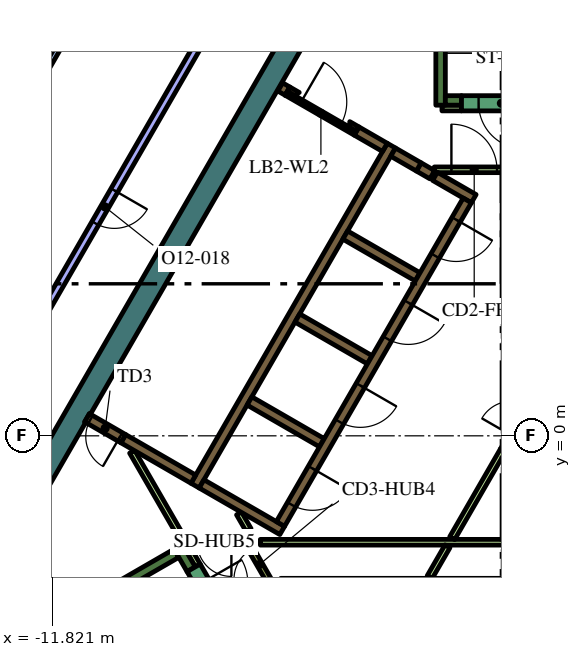
"""IFC4 building model, lengths in metres.
Left out: names, types, materials, properties, quantities, classifications, styles, units other than length and angle.
Written with IfcOpenShell. Run it as: python <this file> out.ifc"""

import sys

from ifc_helpers import new_model, si_unit, direction, frame, frame_2d, origin, place, context, subcontext, project, spatial, polyline, rectangle, outline, extrude, element, fill, save


model = new_model("IFC4")
c1 = context("Model", 3, precision=1e-05, world=origin(), true_north=direction((0.0, 1.0)))
c2 = subcontext(c1, "Body", "Model", "MODEL_VIEW")
j1 = project(units=[si_unit("LENGTHUNIT", "METRE"), si_unit("PLANEANGLEUNIT", "RADIAN")], contexts=[c1])
p1 = place(None, origin())
s1 = spatial("IfcSite", under=j1, at=p1, CompositionType="ELEMENT")
p2 = place(p1, origin())
s2 = spatial("IfcBuilding", under=s1, at=p2, CompositionType="ELEMENT")
p3 = place(p2, frame((0.0, 0.0, 288.0)))
s3 = spatial("IfcBuildingStorey", under=s2, at=p3, CompositionType="ELEMENT", Elevation=288.0)
p4 = place(p3, origin())
e1 = element("IfcWall", 1, at=p4, inside=s3, PredefinedType="SOLIDWALL", context=c2, shape_type="SweptSolid", body=[
    extrude(outline(polyline([(-15.502, -6.35), (-4.912, 11.992), (-4.393, 11.692), (-10.815, 0.569), (-10.84, 0.583), (-10.84, 0.583), (-10.84, 0.583), (-10.965, 0.367), (-10.965, 0.367), (-10.965, 0.367), (-10.94, 0.352), (-11.033, 0.191), (-14.809, -6.35), (-15.156, -6.95), (-15.502, -6.35)])), origin(), (0.0, 0.0, 1.0), 4.2),
])
p5 = place(p3, frame((-1.6, 8.7, 0.0), z_axis=(0.0, 0.0, 1.0), x_axis=(0.0, 1.0, 0.0)))
e2 = element("IfcWall", 2, at=p5, inside=s3, PredefinedType="SOLIDWALL", context=c2, shape_type="SweptSolid", body=[
    extrude(rectangle(XDim=7.05, YDim=0.25, at=frame_2d((3.525, 0.0))), origin(), (0.0, 0.0, 1.0), 4.2),
])
p6 = place(p3, frame((-1.475, 8.825, 0.0), z_axis=(0.0, 0.0, 1.0), x_axis=(1.0, 0.0, 0.0)))
e3 = element("IfcWall", 3, at=p6, inside=s3, PredefinedType="SOLIDWALL", context=c2, shape_type="SweptSolid", body=[
    extrude(rectangle(XDim=0.425, YDim=0.25, at=frame_2d((0.212, 0.0))), origin(), (0.0, 0.0, 1.0), 4.2),
])
p7 = place(p3, frame((-14.44, -6.49, 0.0), z_axis=(0.0, 0.0, 1.0), x_axis=(0.866022966069, 0.500004222222, 0.0)))
e4 = element("IfcWall", 4, at=p7, inside=s3, PredefinedType="SOLIDWALL", context=c2, shape_type="SweptSolid", body=[
    extrude(rectangle(XDim=6.8, YDim=0.25, at=frame_2d((3.4, 0.0))), origin(), (0.0, 0.0, 1.0), 4.2),
])
p8 = place(p3, frame((-8.163, -3.511, 0.0), z_axis=(0.0, 0.0, 1.0), x_axis=(-0.499994068514, 0.866028828302, 0.0)))
e5 = element("IfcWall", 5, at=p8, inside=s3, PredefinedType="SOLIDWALL", context=c2, shape_type="SweptSolid", body=[
    extrude(rectangle(XDim=0.674, YDim=0.25, at=frame_2d((0.337, 0.0))), origin(), (0.0, 0.0, 1.0), 4.2),
])
p9 = place(p3, frame((-8.06, -1.311, 0.0), z_axis=(0.0, 0.0, 1.0), x_axis=(0.50000273126, 0.866023826885, 0.0)))
e6 = element("IfcWall", 6, at=p9, inside=s3, PredefinedType="SOLIDWALL", context=c2, shape_type="SweptSolid", body=[
    extrude(rectangle(XDim=10.33, YDim=0.25, at=frame_2d((5.165, 0.0))), origin(), (0.0, 0.0, 1.0), 4.2),
])
p10 = place(p3, frame((-1.819, 6.87, 0.0), z_axis=(0.0, 0.0, 1.0), x_axis=(-0.866294599386, 0.499533449405, 0.0)))
e7 = element("IfcWall", 7, at=p10, inside=s3, PredefinedType="SOLIDWALL", context=c2, shape_type="SweptSolid", body=[
    extrude(rectangle(XDim=0.41, YDim=0.25, at=frame_2d((0.205, 0.0))), origin(), (0.0, 0.0, 1.0), 4.2),
])
p11 = place(p3, frame((-2.849, 7.465, 0.0), z_axis=(0.0, 0.0, 1.0), x_axis=(0.865955664968, -0.500120771724, 0.0)))
e8 = element("IfcWall", 8, at=p11, inside=s3, PredefinedType="SOLIDWALL", context=c2, shape_type="SweptSolid", body=[
    extrude(rectangle(XDim=0.778, YDim=0.25, at=frame_2d((0.389, 0.0))), origin(), (0.0, 0.0, 1.0), 4.2),
])
p12 = place(p3, frame((-0.728, 6.24, 0.0), z_axis=(0.0, 0.0, 1.0), x_axis=(-0.866002680491, 0.500039355833, 0.0)))
e9 = element("IfcWall", 9, at=p12, inside=s3, PredefinedType="SOLIDWALL", context=c2, shape_type="SweptSolid", body=[
    extrude(rectangle(XDim=1.178, YDim=0.25, at=frame_2d((0.589, 0.0))), origin(), (0.0, 0.0, 1.0), 4.2),
])
for number, where, z_axis, x_axis in (
    (10, (-2.204, 4.182, 0.0), (0.0, 0.0, 1.0), (-0.866, 0.5, 0.0)),
    (11, (-5.369, 3.1, 0.0), (0.0, 0.0, 1.0), (0.866, -0.5, 0.0)),
    (12, (-4.724, -0.182, 0.0), (0.0, 0.0, 1.0), (-0.866, 0.5, 0.0)),
):
    element("IfcWall", number, at=place(p3, frame(where, z_axis=z_axis, x_axis=x_axis)), inside=s3, PredefinedType="SOLIDWALL", context=c2, shape_type="SweptSolid", body=[
        extrude(rectangle(XDim=2.2, YDim=0.25, at=frame_2d((1.1, 0.0))), origin(), (0.0, 0.0, 1.0), 4.2),
    ])
p13 = place(p3, frame((-7.889, -1.265, 0.0), z_axis=(0.0, 0.0, 1.0), x_axis=(0.866057815567, -0.499943856944, 0.0)))
e13 = element("IfcWall", 13, at=p13, inside=s3, PredefinedType="SOLIDWALL", context=c2, shape_type="SweptSolid", body=[
    extrude(rectangle(XDim=2.45, YDim=0.25, at=frame_2d((1.225, 0.0))), origin(), (0.0, 0.0, 1.0), 4.2),
])
p14 = place(p3, frame((-9.95, -0.075, 0.0), z_axis=(0.0, 0.0, 1.0), x_axis=(0.865962177421, -0.500109495288, 0.0)))
e14 = element("IfcWall", 14, at=p14, inside=s3, PredefinedType="SOLIDWALL", context=c2, shape_type="SweptSolid", body=[
    extrude(rectangle(XDim=2.129, YDim=0.25, at=frame_2d((1.065, 0.0))), origin(), (0.0, 0.0, 1.0), 4.2),
])
p15 = place(p3, frame((-5.629, 9.07, 0.0), z_axis=(0.0, 0.0, 1.0), x_axis=(-0.866185586049, 0.49972245349, 0.0)))
e15 = element("IfcWall", 15, at=p15, inside=s3, PredefinedType="SOLIDWALL", context=c2, shape_type="SweptSolid", body=[
    extrude(rectangle(XDim=0.22, YDim=0.25, at=frame_2d((0.11, 0.0))), origin(), (0.0, 0.0, 1.0), 4.2),
])
p16 = place(p3, frame((-3.809, 8.019, 0.0), z_axis=(0.0, 0.0, 1.0), x_axis=(0.866010229787, -0.500026281214, 0.0)))
e16 = element("IfcWall", 16, at=p16, inside=s3, PredefinedType="SOLIDWALL", context=c2, shape_type="SweptSolid", body=[
    extrude(rectangle(XDim=0.858, YDim=0.25, at=frame_2d((0.429, 0.0))), origin(), (0.0, 0.0, 1.0), 4.2),
])
e17 = element("IfcWall", 17, at=p4, inside=s3, PredefinedType="SOLIDWALL", context=c2, shape_type="SweptSolid", body=[
    extrude(outline(polyline([(-3.748, 8.128), (-3.813, 8.015), (-4.027, 8.139), (-4.017, 8.156), (-4.008, 8.173), (-4.0, 8.192), (-3.995, 8.21), (-3.991, 8.23), (-3.99, 8.25), (-3.99, 8.268), (-3.748, 8.128)])), origin(), (0.0, 0.0, 1.0), 4.2),
])
e18 = element("IfcWall", 18, at=p4, inside=s3, PredefinedType="SOLIDWALL", context=c2, shape_type="SweptSolid", body=[
    extrude(outline(polyline([(-5.689, 8.96), (-5.69, 8.961), (-5.565, 9.177), (-5.319, 9.035), (-5.335, 9.026), (-5.351, 9.015), (-5.366, 9.002), (-5.379, 8.988), (-5.392, 8.972), (-5.402, 8.956), (-5.412, 8.939), (-5.629, 9.064), (-5.629, 9.064), (-5.689, 8.96)])), origin(), (0.0, 0.0, 1.0), 4.2),
])
p17 = place(p3, frame((-9.718, -0.417, 0.0), z_axis=(0.0, 0.0, 1.0), x_axis=(0.499966538646, -0.866044721844, 0.0)))
e19 = element("IfcWall", 19, at=p17, inside=s3, PredefinedType="PARTITIONING", context=c2, shape_type="SweptSolid", body=[
    extrude(rectangle(XDim=2.511, YDim=0.15, at=frame_2d((1.255, 0.0))), origin(), (0.0, 0.0, 1.0), 3.55),
])
p18 = place(p3, frame((1.438, -2.8, 0.0), z_axis=(0.0, 0.0, 1.0), x_axis=(-1.0, 0.0, 0.0)))
e20 = element("IfcWall", 20, at=p18, inside=s3, PredefinedType="PARTITIONING", context=c2, shape_type="SweptSolid", body=[
    extrude(rectangle(XDim=7.781, YDim=0.15, at=frame_2d((3.891, 0.0))), origin(), (0.0, 0.0, 1.0), 3.55),
])
p19 = place(p3, frame((-1.418, -2.907, 0.0), z_axis=(0.0, 0.0, 1.0), x_axis=(-0.499978056798, -0.866038072327, 0.0)))
e21 = element("IfcWall", 21, at=p19, inside=s3, PredefinedType="PARTITIONING", context=c2, shape_type="SweptSolid", body=[
    extrude(rectangle(XDim=0.937, YDim=0.15, at=frame_2d((0.469, 0.0))), origin(), (0.0, 0.0, 1.0), 3.55),
])
p20 = place(p3, frame((-1.295, -2.693, 0.0), z_axis=(0.0, 0.0, 1.0), x_axis=(0.500030943131, 0.866007538022, 0.0)))
e22 = element("IfcWall", 22, at=p20, inside=s3, PredefinedType="PARTITIONING", context=c2, shape_type="SweptSolid", body=[
    extrude(rectangle(XDim=2.672, YDim=0.15, at=frame_2d((1.336, 0.0))), origin(), (0.0, 0.0, 1.0), 3.55),
])
p21 = place(p3, frame((-6.653, -2.477, 0.0), z_axis=(0.0, 0.0, 1.0), x_axis=(-0.500002592159, 0.866023907196, 0.0)))
e23 = element("IfcWall", 23, at=p21, inside=s3, PredefinedType="PARTITIONING", context=c2, shape_type="SweptSolid", body=[
    extrude(rectangle(XDim=0.503, YDim=0.15, at=frame_2d((0.251, 0.0))), origin(), (0.0, 0.0, 1.0), 3.55),
])
p22 = place(p3, frame((-7.99, -3.412, 0.0), z_axis=(0.0, 0.0, 1.0), x_axis=(-0.499858525911, 0.866107068482, 0.0)))
e24 = element("IfcWall", 24, at=p22, inside=s3, PredefinedType="PARTITIONING", context=c2, shape_type="SweptSolid", body=[
    extrude(rectangle(XDim=0.466, YDim=0.15, at=frame_2d((0.233, 0.0))), origin(), (0.0, 0.0, 1.0), 3.55),
])
p23 = place(p3, frame((-1.564, 8.625, 0.0), z_axis=(0.0, 0.0, 1.0), x_axis=(1.0, 0.0, 0.0)))
e25 = element("IfcWall", 25, at=p23, inside=s3, PredefinedType="PARTITIONING", context=c2, shape_type="SweptSolid", body=[
    extrude(rectangle(XDim=0.514, YDim=0.15, at=frame_2d((0.257, 0.0))), origin(), (0.0, 0.0, 1.0), 3.55),
])
p24 = place(p3, frame((-0.898, 6.194, 0.0), z_axis=(0.0, 0.0, 1.0), x_axis=(-0.499996202215, -0.866027596426, 0.0)))
e26 = element("IfcWall", 26, at=p24, inside=s3, PredefinedType="SOLIDWALL", context=c2, shape_type="SweptSolid", body=[
    extrude(rectangle(XDim=9.83, YDim=0.25, at=frame_2d((4.915, 0.0))), origin(), (0.0, 0.0, 1.0), 4.2),
])
p25 = place(p24, frame((0.585, 0.0, 0.0)))
e27 = element("IfcOpeningElement", 27, at=p25, cuts=e26, PredefinedType="OPENING", context=c2, shape_type="SweptSolid", body=[
    extrude(rectangle(XDim=1.1, YDim=2.1, at=frame_2d((0.55, 1.05))), frame((0.0, 0.135, 0.0), z_axis=(0.0, -1.0, 0.0), x_axis=(1.0, 0.0, 0.0)), (0.0, 0.0, 1.0), 0.27),
])
p26 = place(p24, frame((3.105, 0.0, 0.0)))
e28 = element("IfcOpeningElement", 28, at=p26, cuts=e26, PredefinedType="OPENING", context=c2, shape_type="SweptSolid", body=[
    extrude(rectangle(XDim=1.1, YDim=2.1, at=frame_2d((0.55, 1.05))), frame((0.0, 0.135, 0.0), z_axis=(0.0, -1.0, 0.0), x_axis=(1.0, 0.0, 0.0)), (0.0, 0.0, 1.0), 0.27),
])
p27 = place(p24, frame((5.625, 0.0, 0.0)))
e29 = element("IfcOpeningElement", 29, at=p27, cuts=e26, PredefinedType="OPENING", context=c2, shape_type="SweptSolid", body=[
    extrude(rectangle(XDim=1.1, YDim=2.1, at=frame_2d((0.55, 1.05))), frame((0.0, 0.135, 0.0), z_axis=(0.0, -1.0, 0.0), x_axis=(1.0, 0.0, 0.0)), (0.0, 0.0, 1.0), 0.27),
])
p28 = place(p24, frame((8.145, 0.0, 0.0)))
e30 = element("IfcOpeningElement", 30, at=p28, cuts=e26, PredefinedType="OPENING", context=c2, shape_type="SweptSolid", body=[
    extrude(rectangle(XDim=1.1, YDim=2.1, at=frame_2d((0.55, 1.05))), frame((0.0, 0.135, 0.0), z_axis=(0.0, -1.0, 0.0), x_axis=(1.0, 0.0, 0.0)), (0.0, 0.0, 1.0), 0.27),
])
p29 = place(p3, frame((1.05, 8.75, 0.0), z_axis=(0.0, 0.0, 1.0), x_axis=(-1.0, 0.0, 0.0)))
e31 = element("IfcWall", 31, at=p29, inside=s3, PredefinedType="SOLIDWALL", context=c2, shape_type="SweptSolid", body=[
    extrude(rectangle(XDim=2.1, YDim=0.4, at=frame_2d((1.05, 0.0))), origin(), (0.0, 0.0, 1.0), 4.2),
])
p30 = place(p29, frame((0.45, 0.0, 0.0)))
e32 = element("IfcOpeningElement", 32, at=p30, cuts=e31, PredefinedType="OPENING", context=c2, shape_type="SweptSolid", body=[
    extrude(rectangle(XDim=1.2, YDim=2.1, at=frame_2d((0.6, 1.05))), frame((0.0, 0.21, 0.0), z_axis=(0.0, -1.0, 0.0), x_axis=(1.0, 0.0, 0.0)), (0.0, 0.0, 1.0), 0.42),
])
p31 = place(p3, frame((-8.098, -3.474, 0.0), z_axis=(0.0, 0.0, 1.0), x_axis=(0.49994051562, -0.866059744384, 0.0)))
e33 = element("IfcWall", 33, at=p31, inside=s3, PredefinedType="SOLIDWALL", context=c2, shape_type="SweptSolid", body=[
    extrude(rectangle(XDim=2.1, YDim=0.4, at=frame_2d((1.05, 0.0))), origin(), (0.0, 0.0, 1.0), 4.2),
])
p32 = place(p31, frame((0.45, 0.0, 0.0)))
e34 = element("IfcOpeningElement", 34, at=p32, cuts=e33, PredefinedType="OPENING", context=c2, shape_type="SweptSolid", body=[
    extrude(rectangle(XDim=1.2, YDim=2.1, at=frame_2d((0.6, 1.05))), frame((0.0, 0.21, 0.0), z_axis=(0.0, -1.0, 0.0), x_axis=(1.0, 0.0, 0.0)), (0.0, 0.0, 1.0), 0.42),
])
p33 = place(p3, frame((-1.765, 7.0, 0.0), z_axis=(0.0, 0.0, 1.0), x_axis=(1.0, 0.0, 0.0)))
e35 = element("IfcWall", 35, at=p33, inside=s3, PredefinedType="PARTITIONING", context=c2, shape_type="SweptSolid", body=[
    extrude(rectangle(XDim=2.1, YDim=0.15, at=frame_2d((1.05, 0.0))), origin(), (0.0, 0.0, 1.0), 3.55),
])
p34 = place(p33, frame((0.45, 0.0, 0.0)))
e36 = element("IfcOpeningElement", 36, at=p34, cuts=e35, PredefinedType="OPENING", context=c2, shape_type="SweptSolid", body=[
    extrude(rectangle(XDim=1.2, YDim=2.1, at=frame_2d((0.6, 1.05))), frame((0.0, 0.085, 0.0), z_axis=(0.0, -1.0, 0.0), x_axis=(1.0, 0.0, 0.0)), (0.0, 0.0, 1.0), 0.17),
])
p35 = place(p3, frame((-5.861, -4.248, 0.0), z_axis=(0.0, 0.0, 1.0), x_axis=(-0.500043646338, 0.866000203093, 0.0)))
e37 = element("IfcWall", 37, at=p35, inside=s3, PredefinedType="PARTITIONING", context=c2, shape_type="SweptSolid", body=[
    extrude(rectangle(XDim=1.93, YDim=0.15, at=frame_2d((0.965, 0.0))), origin(), (0.0, 0.0, 1.0), 4.2),
])
p36 = place(p35, frame((0.55, 0.0, 0.0)))
e38 = element("IfcOpeningElement", 38, at=p36, cuts=e37, PredefinedType="OPENING", context=c2, shape_type="SweptSolid", body=[
    extrude(rectangle(XDim=0.9, YDim=2.1, at=frame_2d((0.45, 1.05))), frame((0.0, 0.085, 0.0), z_axis=(0.0, -1.0, 0.0), x_axis=(1.0, 0.0, 0.0)), (0.0, 0.0, 1.0), 0.17),
])
p37 = place(p3, frame((-5.659, 9.012, 0.0), z_axis=(0.0, 0.0, 1.0), x_axis=(0.866009402589, -0.500027713859, 0.0)))
e39 = element("IfcWall", 39, at=p37, inside=s3, PredefinedType="PARTITIONING", context=c2, shape_type="SweptSolid", body=[
    extrude(rectangle(XDim=2.1, YDim=0.12, at=frame_2d((1.05, 0.0))), origin(), (0.0, 0.0, 1.0), 3.55),
])
p38 = place(p37, frame((0.45, 0.0, 0.0)))
e40 = element("IfcOpeningElement", 40, at=p38, cuts=e39, PredefinedType="OPENING", context=c2, shape_type="SweptSolid", body=[
    extrude(rectangle(XDim=1.2, YDim=2.1, at=frame_2d((0.6, 1.05))), frame((0.0, 0.07, 0.0), z_axis=(0.0, -1.0, 0.0), x_axis=(1.0, 0.0, 0.0)), (0.0, 0.0, 1.0), 0.14),
])
p39 = place(p3, frame((0.041, -0.379, 0.0), z_axis=(0.0, 0.0, 1.0), x_axis=(0.499961193289, 0.866047807691, 0.0)))
e41 = element("IfcWall", 41, at=p39, inside=s3, PredefinedType="PARTITIONING", context=c2, shape_type="SweptSolid", body=[
    extrude(rectangle(XDim=1.8, YDim=0.15, at=frame_2d((0.9, 0.0))), origin(), (0.0, 0.0, 1.0), 3.55),
])
p40 = place(p39, frame((0.45, 0.0, 0.0)))
e42 = element("IfcOpeningElement", 42, at=p40, cuts=e41, PredefinedType="OPENING", context=c2, shape_type="SweptSolid", body=[
    extrude(rectangle(XDim=0.9, YDim=2.1, at=frame_2d((0.45, 1.05))), frame((0.0, 0.085, 0.0), z_axis=(0.0, -1.0, 0.0), x_axis=(1.0, 0.0, 0.0)), (0.0, 0.0, 1.0), 0.17),
])
p41 = place(p3, frame((-6.655, -2.8, 0.0), z_axis=(0.0, 0.0, 1.0), x_axis=(-1.0, 0.0, 0.0)))
e43 = element("IfcWall", 43, at=p41, inside=s3, PredefinedType="PARTITIONING", context=c2, shape_type="SweptSolid", body=[
    extrude(rectangle(XDim=1.8, YDim=0.15, at=frame_2d((0.9, 0.0))), origin(), (0.0, 0.0, 1.0), 3.55),
])
p42 = place(p41, frame((0.45, 0.0, 0.0)))
e44 = element("IfcOpeningElement", 44, at=p42, cuts=e43, PredefinedType="OPENING", context=c2, shape_type="SweptSolid", body=[
    extrude(rectangle(XDim=0.9, YDim=2.1, at=frame_2d((0.45, 1.05))), frame((0.0, 0.085, 0.0), z_axis=(0.0, -1.0, 0.0), x_axis=(1.0, 0.0, 0.0)), (0.0, 0.0, 1.0), 0.17),
])
p43 = place(p3, frame((-9.95, -0.075, 0.0), z_axis=(0.0, 0.0, 1.0), x_axis=(-0.865952669392, 0.500125958508, 0.0)))
e45 = element("IfcWall", 45, at=p43, inside=s3, PredefinedType="SOLIDWALL", context=c2, shape_type="SweptSolid", body=[
    extrude(rectangle(XDim=1.1, YDim=0.25, at=frame_2d((0.55, 0.0))), origin(), (0.0, 0.0, 1.0), 4.2),
])
p44 = place(p43, frame((0.1, 0.0, 0.0)))
e46 = element("IfcOpeningElement", 46, at=p44, cuts=e45, PredefinedType="OPENING", context=c2, shape_type="SweptSolid", body=[
    extrude(rectangle(XDim=0.9, YDim=2.1, at=frame_2d((0.45, 1.05))), frame((0.0, 0.135, 0.0), z_axis=(0.0, -1.0, 0.0), x_axis=(1.0, 0.0, 0.0)), (0.0, 0.0, 1.0), 0.27),
])
p45 = place(p3, frame((-14.74, 4.887, 0.0), z_axis=(0.0, 0.0, 1.0), x_axis=(0.500007141444, 0.86602128063, 0.0)))
e47 = element("IfcWall", 47, at=p45, inside=s3, PredefinedType="PARTITIONING", context=c2, shape_type="SweptSolid", body=[
    extrude(rectangle(XDim=6.137, YDim=0.15, at=frame_2d((3.068, 0.0))), origin(), (0.0, 0.0, 1.0), 3.55),
])
p46 = place(p45, frame((2.637, 0.0, 0.0)))
e48 = element("IfcOpeningElement", 48, at=p46, cuts=e47, PredefinedType="OPENING", context=c2, shape_type="SweptSolid", body=[
    extrude(rectangle(XDim=0.9, YDim=2.1, at=frame_2d((0.45, 1.05))), frame((0.0, 0.085, 0.0), z_axis=(0.0, -1.0, 0.0), x_axis=(1.0, 0.0, 0.0)), (0.0, 0.0, 1.0), 0.17),
])
p47 = place(p3, frame((-7.436, 11.221, 0.0), z_axis=(0.0, 0.0, 1.0), x_axis=(-0.49999894854, -0.866026010844, 0.0)))
e49 = element("IfcWall", 49, at=p47, inside=s3, PredefinedType="PARTITIONING", context=c2, shape_type="SweptSolid", body=[
    extrude(rectangle(XDim=12.0, YDim=0.2, at=frame_2d((6.0, 0.0))), origin(), (0.0, 0.0, 1.0), 3.55),
])
p48 = place(p47, frame((5.5, 0.0, 0.0)))
e50 = element("IfcOpeningElement", 50, at=p48, cuts=e49, PredefinedType="OPENING", context=c2, shape_type="SweptSolid", body=[
    extrude(rectangle(XDim=1.0, YDim=2.1, at=frame_2d((0.5, 1.05))), frame((0.0, 0.11, 0.0), z_axis=(0.0, -1.0, 0.0), x_axis=(1.0, 0.0, 0.0)), (0.0, 0.0, 1.0), 0.22),
])
p49 = place(p25, origin())
e51 = element("IfcDoor", 51, at=p49, inside=s3, OperationType="DOUBLE_DOOR_SLIDING", PredefinedType="DOOR", context=c2, shape_type="SweptSolid", body=[
    extrude(rectangle(XDim=1.1, YDim=2.1, at=frame_2d((0.55, 1.05))), frame((0.0, 0.025, 0.0), z_axis=(0.0, -1.0, 0.0), x_axis=(1.0, 0.0, 0.0)), (0.0, 0.0, 1.0), 0.05),
])
fill(e27, e51)
p50 = place(p26, origin())
e52 = element("IfcDoor", 52, at=p50, inside=s3, OperationType="DOUBLE_DOOR_SLIDING", PredefinedType="DOOR", context=c2, shape_type="SweptSolid", body=[
    extrude(rectangle(XDim=1.1, YDim=2.1, at=frame_2d((0.55, 1.05))), frame((0.0, 0.025, 0.0), z_axis=(0.0, -1.0, 0.0), x_axis=(1.0, 0.0, 0.0)), (0.0, 0.0, 1.0), 0.05),
])
fill(e28, e52)
p51 = place(p27, origin())
e53 = element("IfcDoor", 53, at=p51, inside=s3, OperationType="DOUBLE_DOOR_SLIDING", PredefinedType="DOOR", context=c2, shape_type="SweptSolid", body=[
    extrude(rectangle(XDim=1.1, YDim=2.1, at=frame_2d((0.55, 1.05))), frame((0.0, 0.025, 0.0), z_axis=(0.0, -1.0, 0.0), x_axis=(1.0, 0.0, 0.0)), (0.0, 0.0, 1.0), 0.05),
])
fill(e29, e53)
p52 = place(p28, origin())
e54 = element("IfcDoor", 54, at=p52, inside=s3, OperationType="DOUBLE_DOOR_SLIDING", PredefinedType="DOOR", context=c2, shape_type="SweptSolid", body=[
    extrude(rectangle(XDim=1.1, YDim=2.1, at=frame_2d((0.55, 1.05))), frame((0.0, 0.025, 0.0), z_axis=(0.0, -1.0, 0.0), x_axis=(1.0, 0.0, 0.0)), (0.0, 0.0, 1.0), 0.05),
])
fill(e30, e54)
p53 = place(p30, origin())
e55 = element("IfcDoor", 55, at=p53, inside=s3, OperationType="SINGLE_SWING_LEFT", PredefinedType="DOOR", context=c2, shape_type="SweptSolid", body=[
    extrude(rectangle(XDim=1.2, YDim=2.1, at=frame_2d((0.6, 1.05))), frame((0.0, 0.025, 0.0), z_axis=(0.0, -1.0, 0.0), x_axis=(1.0, 0.0, 0.0)), (0.0, 0.0, 1.0), 0.05),
])
fill(e32, e55)
p54 = place(p34, origin())
e56 = element("IfcDoor", 56, at=p54, inside=s3, OperationType="SINGLE_SWING_LEFT", PredefinedType="DOOR", context=c2, shape_type="SweptSolid", body=[
    extrude(rectangle(XDim=1.2, YDim=2.1, at=frame_2d((0.6, 1.05))), frame((0.0, 0.025, 0.0), z_axis=(0.0, -1.0, 0.0), x_axis=(1.0, 0.0, 0.0)), (0.0, 0.0, 1.0), 0.05),
])
fill(e36, e56)
p55 = place(p36, origin())
e57 = element("IfcDoor", 57, at=p55, inside=s3, OperationType="SINGLE_SWING_LEFT", PredefinedType="DOOR", context=c2, shape_type="SweptSolid", body=[
    extrude(rectangle(XDim=0.9, YDim=2.1, at=frame_2d((0.45, 1.05))), frame((0.0, 0.025, 0.0), z_axis=(0.0, -1.0, 0.0), x_axis=(1.0, 0.0, 0.0)), (0.0, 0.0, 1.0), 0.05),
])
fill(e38, e57)
p56 = place(p38, origin())
e58 = element("IfcDoor", 58, at=p56, inside=s3, OperationType="SINGLE_SWING_LEFT", PredefinedType="DOOR", context=c2, shape_type="SweptSolid", body=[
    extrude(rectangle(XDim=1.2, YDim=2.1, at=frame_2d((0.6, 1.05))), frame((0.0, 0.025, 0.0), z_axis=(0.0, -1.0, 0.0), x_axis=(1.0, 0.0, 0.0)), (0.0, 0.0, 1.0), 0.05),
])
fill(e40, e58)
p57 = place(p42, origin())
e59 = element("IfcDoor", 59, at=p57, inside=s3, OperationType="SINGLE_SWING_LEFT", PredefinedType="DOOR", context=c2, shape_type="SweptSolid", body=[
    extrude(rectangle(XDim=0.9, YDim=2.1, at=frame_2d((0.45, 1.05))), frame((0.0, 0.025, 0.0), z_axis=(0.0, -1.0, 0.0), x_axis=(1.0, 0.0, 0.0)), (0.0, 0.0, 1.0), 0.05),
])
fill(e44, e59)
p58 = place(p44, origin())
e60 = element("IfcDoor", 60, at=p58, inside=s3, OperationType="SINGLE_SWING_LEFT", PredefinedType="DOOR", context=c2, shape_type="SweptSolid", body=[
    extrude(rectangle(XDim=0.9, YDim=2.1, at=frame_2d((0.45, 1.05))), frame((0.0, 0.025, 0.0), z_axis=(0.0, -1.0, 0.0), x_axis=(1.0, 0.0, 0.0)), (0.0, 0.0, 1.0), 0.05),
])
fill(e46, e60)
p59 = place(p48, origin())
e61 = element("IfcDoor", 61, at=p59, inside=s3, OperationType="SINGLE_SWING_RIGHT", PredefinedType="DOOR", context=c2, shape_type="SweptSolid", body=[
    extrude(rectangle(XDim=1.0, YDim=2.1, at=frame_2d((0.5, 1.05))), frame((0.0, 0.025, 0.0), z_axis=(0.0, -1.0, 0.0), x_axis=(1.0, 0.0, 0.0)), (0.0, 0.0, 1.0), 0.05),
])
fill(e50, e61)
save(model, sys.argv[1])
